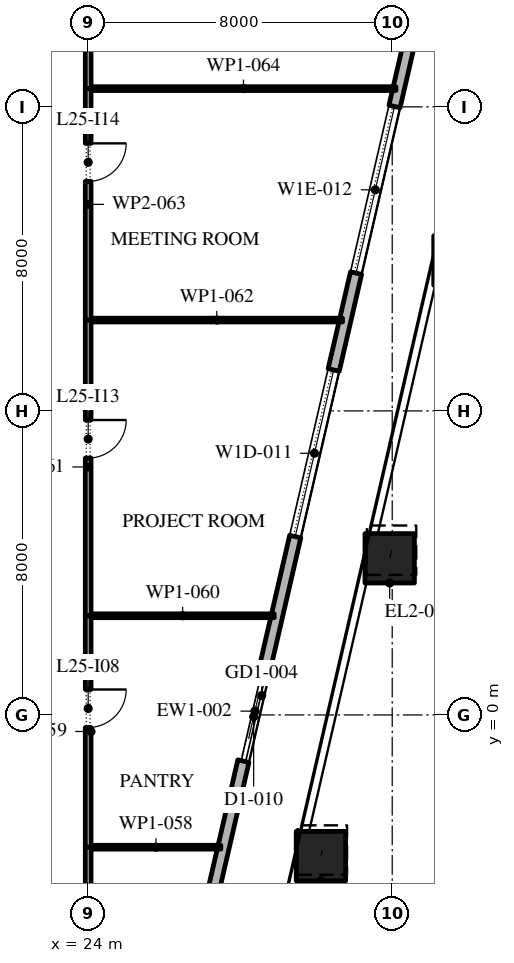
"""IFC4 building model, lengths in metres.
Left out: names, types, materials, properties, quantities, classifications, styles, units other than length and angle.
Written with IfcOpenShell. Run it as: python <this file> out.ifc"""

import sys

from ifc_helpers import new_model, si_unit, direction, frame, frame_2d, origin, origin_2d, place, context, subcontext, project, spatial, rectangle, extrude, element, fill, save


model = new_model("IFC4")
c1 = context("Model", 3, precision=1e-05, world=origin(), true_north=direction((0.0, 1.0)))
c2 = subcontext(c1, "Body", "Model", "MODEL_VIEW")
j1 = project(units=[si_unit("LENGTHUNIT", "METRE"), si_unit("PLANEANGLEUNIT", "RADIAN")], contexts=[c1])
p1 = place(None, origin())
s1 = spatial("IfcSite", under=j1, at=p1, CompositionType="ELEMENT")
p2 = place(p1, origin())
s2 = spatial("IfcBuilding", under=s1, at=p2, CompositionType="ELEMENT")
p3 = place(p2, frame((0.0, 0.0, 118.2)))
s3 = spatial("IfcBuildingStorey", under=s2, at=p3, CompositionType="ELEMENT", Elevation=118.2)
p4 = place(p3, frame((30.125, -3.714, 0.0), z_axis=(0.008770884695, 0.037929719907, 0.99924191662), x_axis=(-0.974290512438, 0.225295355862, 0.0)))
e1 = element("IfcColumn", 1, at=p4, inside=s3, PredefinedType="COLUMN", context=c2, shape_type="SweptSolid", body=[
    extrude(rectangle(XDim=1.3, YDim=1.3, at=origin_2d()), origin(), (0.0, 0.0, 1.0), 4.203),
])
p5 = place(p3, frame((31.934, 4.122, 0.0), z_axis=(0.011668267153, 0.050562490995, 0.998652735462), x_axis=(-0.974391195695, 0.224859506699, 0.0)))
e2 = element("IfcColumn", 2, at=p5, inside=s3, PredefinedType="COLUMN", context=c2, shape_type="SweptSolid", body=[
    extrude(rectangle(XDim=1.3, YDim=1.3, at=origin_2d()), origin(), (0.0, 0.0, 1.0), 4.206),
])
p6 = place(p3, frame((33.742, 11.957, 0.0), z_axis=(0.014559841898, 0.063111984005, 0.997900239743), x_axis=(-0.97440628778, 0.224794097641, 0.0)))
e3 = element("IfcColumn", 3, at=p6, inside=s3, PredefinedType="COLUMN", context=c2, shape_type="SweptSolid", body=[
    extrude(rectangle(XDim=1.3, YDim=1.3, at=origin_2d()), origin(), (0.0, 0.0, 1.0), 4.209),
])
p7 = place(p3, frame((22.82, -24.016, 0.0), z_axis=(0.0, 0.0, 1.0), x_axis=(0.224953880882, 0.974369412223, 0.0)))
e4 = element("IfcWall", 4, at=p7, inside=s3, PredefinedType="STANDARD", context=c2, shape_type="SweptSolid", body=[
    extrude(rectangle(XDim=49.5, YDim=0.3, at=frame_2d((24.75, 0.0))), origin(), (0.0, 0.0, 1.0), 4.0),
])
p8 = place(p7, frame((1.157, 0.0, 0.45)))
e5 = element("IfcOpeningElement", 5, at=p8, cuts=e4, PredefinedType="OPENING", context=c2, shape_type="SweptSolid", body=[
    extrude(rectangle(XDim=4.5, YDim=3.05, at=frame_2d((2.25, 1.525))), frame((0.0, 0.16, 0.0), z_axis=(0.0, -1.0, 0.0), x_axis=(1.0, 0.0, 0.0)), (0.0, 0.0, 1.0), 0.32),
])
p9 = place(p7, frame((8.121, 0.0, 0.45)))
e6 = element("IfcOpeningElement", 6, at=p9, cuts=e4, PredefinedType="OPENING", context=c2, shape_type="SweptSolid", body=[
    extrude(rectangle(XDim=4.5, YDim=3.05, at=frame_2d((2.25, 1.525))), frame((0.0, 0.16, 0.0), z_axis=(0.0, -1.0, 0.0), x_axis=(1.0, 0.0, 0.0)), (0.0, 0.0, 1.0), 0.32),
])
p10 = place(p7, frame((15.236, 0.0, 0.45)))
e7 = element("IfcOpeningElement", 7, at=p10, cuts=e4, PredefinedType="OPENING", context=c2, shape_type="SweptSolid", body=[
    extrude(rectangle(XDim=4.5, YDim=3.05, at=frame_2d((2.25, 1.525))), frame((0.0, 0.16, 0.0), z_axis=(0.0, -1.0, 0.0), x_axis=(1.0, 0.0, 0.0)), (0.0, 0.0, 1.0), 0.32),
])
p11 = place(p7, frame((23.4, 0.0, 0.0)))
e8 = element("IfcOpeningElement", 8, at=p11, cuts=e4, PredefinedType="OPENING", context=c2, shape_type="SweptSolid", body=[
    extrude(rectangle(XDim=2.4, YDim=3.5, at=frame_2d((1.2, 1.75))), frame((0.0, 0.16, 0.0), z_axis=(0.0, -1.0, 0.0), x_axis=(1.0, 0.0, 0.0)), (0.0, 0.0, 1.0), 0.32),
])
p12 = place(p7, frame((29.464, 0.0, 0.45)))
e9 = element("IfcOpeningElement", 9, at=p12, cuts=e4, PredefinedType="OPENING", context=c2, shape_type="SweptSolid", body=[
    extrude(rectangle(XDim=4.5, YDim=2.875, at=frame_2d((2.25, 1.438))), frame((0.0, 0.16, 0.0), z_axis=(0.0, -1.0, 0.0), x_axis=(1.0, 0.0, 0.0)), (0.0, 0.0, 1.0), 0.32),
])
p13 = place(p7, frame((36.579, 0.0, 0.45)))
e10 = element("IfcOpeningElement", 10, at=p13, cuts=e4, PredefinedType="OPENING", context=c2, shape_type="SweptSolid", body=[
    extrude(rectangle(XDim=4.5, YDim=2.825, at=frame_2d((2.25, 1.413))), frame((0.0, 0.16, 0.0), z_axis=(0.0, -1.0, 0.0), x_axis=(1.0, 0.0, 0.0)), (0.0, 0.0, 1.0), 0.32),
])
p14 = place(p7, frame((43.693, 0.0, 0.45)))
e11 = element("IfcOpeningElement", 11, at=p14, cuts=e4, PredefinedType="OPENING", context=c2, shape_type="SweptSolid", body=[
    extrude(rectangle(XDim=4.5, YDim=2.75, at=frame_2d((2.25, 1.375))), frame((0.0, 0.16, 0.0), z_axis=(0.0, -1.0, 0.0), x_axis=(1.0, 0.0, 0.0)), (0.0, 0.0, 1.0), 0.32),
])
p15 = place(p3, frame((24.0, -3.43, 0.0), z_axis=(0.0, 0.0, 1.0), x_axis=(0.0, -1.0, 0.0)))
e12 = element("IfcWall", 12, at=p15, inside=s3, PredefinedType="PARTITIONING", context=c2, shape_type="SweptSolid", body=[
    extrude(rectangle(XDim=4.195, YDim=0.15, at=frame_2d((2.098, 0.0))), origin(), (0.0, 0.0, 1.0), 4.0),
])
p16 = place(p15, frame((2.12, 0.0, 0.0)))
e13 = element("IfcOpeningElement", 13, at=p16, cuts=e12, PredefinedType="OPENING", context=c2, shape_type="SweptSolid", body=[
    extrude(rectangle(XDim=1.0, YDim=2.1, at=frame_2d((0.5, 1.05))), frame((0.0, 0.085, 0.0), z_axis=(0.0, -1.0, 0.0), x_axis=(1.0, 0.0, 0.0)), (0.0, 0.0, 1.0), 0.17),
])
p17 = place(p3, frame((24.075, -3.48, 0.0), z_axis=(0.0, 0.0, 1.0), x_axis=(1.0, 0.0, 0.0)))
e14 = element("IfcWall", 14, at=p17, inside=s3, PredefinedType="PARTITIONING", context=c2, shape_type="SweptSolid", body=[
    extrude(rectangle(XDim=3.415, YDim=0.1, at=frame_2d((1.708, 0.0))), origin(), (0.0, 0.0, 1.0), 4.0),
])
p18 = place(p3, frame((24.0, 2.61, 0.0), z_axis=(0.0, 0.0, 1.0), x_axis=(0.0, -1.0, 0.0)))
e15 = element("IfcWall", 15, at=p18, inside=s3, PredefinedType="PARTITIONING", context=c2, shape_type="SweptSolid", body=[
    extrude(rectangle(XDim=6.09, YDim=0.15, at=frame_2d((3.045, 0.0))), origin(), (0.0, 0.0, 1.0), 4.0),
])
p19 = place(p18, frame((1.94, 0.0, 0.0)))
e16 = element("IfcOpeningElement", 16, at=p19, cuts=e15, PredefinedType="OPENING", context=c2, shape_type="SweptSolid", body=[
    extrude(rectangle(XDim=1.0, YDim=2.1, at=frame_2d((0.5, 1.05))), frame((0.0, 0.085, 0.0), z_axis=(0.0, -1.0, 0.0), x_axis=(1.0, 0.0, 0.0)), (0.0, 0.0, 1.0), 0.17),
])
p20 = place(p3, frame((24.075, 2.61, 0.0), z_axis=(0.0, 0.0, 1.0), x_axis=(1.0, 0.0, 0.0)))
e17 = element("IfcWall", 17, at=p20, inside=s3, PredefinedType="PARTITIONING", context=c2, shape_type="SweptSolid", body=[
    extrude(rectangle(XDim=4.821, YDim=0.1, at=frame_2d((2.411, 0.0))), origin(), (0.0, 0.0, 1.0), 4.0),
])
p21 = place(p3, frame((24.0, 10.44, 0.0), z_axis=(0.0, 0.0, 1.0), x_axis=(0.0, -1.0, 0.0)))
e18 = element("IfcWall", 18, at=p21, inside=s3, PredefinedType="PARTITIONING", context=c2, shape_type="SweptSolid", body=[
    extrude(rectangle(XDim=7.83, YDim=0.15, at=frame_2d((3.915, 0.0))), origin(), (0.0, 0.0, 1.0), 4.0),
])
p22 = place(p21, frame((2.68, 0.0, 0.0)))
e19 = element("IfcOpeningElement", 19, at=p22, cuts=e18, PredefinedType="OPENING", context=c2, shape_type="SweptSolid", body=[
    extrude(rectangle(XDim=1.0, YDim=2.1, at=frame_2d((0.5, 1.05))), frame((0.0, 0.085, 0.0), z_axis=(0.0, -1.0, 0.0), x_axis=(1.0, 0.0, 0.0)), (0.0, 0.0, 1.0), 0.17),
])
p23 = place(p3, frame((24.075, 10.39, 0.0), z_axis=(0.0, 0.0, 1.0), x_axis=(1.0, 0.0, 0.0)))
e20 = element("IfcWall", 20, at=p23, inside=s3, PredefinedType="PARTITIONING", context=c2, shape_type="SweptSolid", body=[
    extrude(rectangle(XDim=6.617, YDim=0.1, at=frame_2d((3.309, 0.0))), origin(), (0.0, 0.0, 1.0), 4.0),
])
p24 = place(p3, frame((24.0, 16.48, 0.0), z_axis=(0.0, 0.0, 1.0), x_axis=(0.0, -1.0, 0.0)))
e21 = element("IfcWall", 21, at=p24, inside=s3, PredefinedType="PARTITIONING", context=c2, shape_type="SweptSolid", body=[
    extrude(rectangle(XDim=6.09, YDim=0.15, at=frame_2d((3.045, 0.0))), origin(), (0.0, 0.0, 1.0), 4.0),
])
p25 = place(p24, frame((1.44, 0.0, 0.0)))
e22 = element("IfcOpeningElement", 22, at=p25, cuts=e21, PredefinedType="OPENING", context=c2, shape_type="SweptSolid", body=[
    extrude(rectangle(XDim=1.0, YDim=2.1, at=frame_2d((0.5, 1.05))), frame((0.0, 0.085, 0.0), z_axis=(0.0, -1.0, 0.0), x_axis=(1.0, 0.0, 0.0)), (0.0, 0.0, 1.0), 0.17),
])
p26 = place(p3, frame((24.075, 16.48, 0.0), z_axis=(0.0, 0.0, 1.0), x_axis=(1.0, 0.0, 0.0)))
e23 = element("IfcWall", 23, at=p26, inside=s3, PredefinedType="PARTITIONING", context=c2, shape_type="SweptSolid", body=[
    extrude(rectangle(XDim=8.023, YDim=0.1, at=frame_2d((4.011, 0.0))), origin(), (0.0, 0.0, 1.0), 4.0),
])
p27 = place(p3, frame((24.0, 27.325, 0.0), z_axis=(0.0, 0.0, 1.0), x_axis=(0.0, -1.0, 0.0)))
e24 = element("IfcWall", 24, at=p27, inside=s3, PredefinedType="PARTITIONING", context=c2, shape_type="SweptSolid", body=[
    extrude(rectangle(XDim=10.845, YDim=0.15, at=frame_2d((5.422, 0.0))), origin(), (0.0, 0.0, 1.0), 4.0),
])
p28 = place(p27, frame((3.695, 0.0, 0.0)))
e25 = element("IfcOpeningElement", 25, at=p28, cuts=e24, PredefinedType="OPENING", context=c2, shape_type="SweptSolid", body=[
    extrude(rectangle(XDim=1.0, YDim=2.1, at=frame_2d((0.5, 1.05))), frame((0.0, 0.085, 0.0), z_axis=(0.0, -1.0, 0.0), x_axis=(1.0, 0.0, 0.0)), (0.0, 0.0, 1.0), 0.17),
])
p29 = place(p11, origin())
e26 = element("IfcDoor", 26, at=p29, inside=s3, OperationType="DOUBLE_DOOR_SLIDING", PredefinedType="DOOR", context=c2, shape_type="SweptSolid", body=[
    extrude(rectangle(XDim=2.4, YDim=3.5, at=frame_2d((1.2, 1.75))), frame((0.0, 0.025, 0.0), z_axis=(0.0, -1.0, 0.0), x_axis=(1.0, 0.0, 0.0)), (0.0, 0.0, 1.0), 0.05),
])
fill(e8, e26)
p30 = place(p12, origin())
e27 = element("IfcWindow", 27, at=p30, inside=s3, PartitioningType="DOUBLE_PANEL_VERTICAL", PredefinedType="WINDOW", context=c2, shape_type="SweptSolid", body=[
    extrude(rectangle(XDim=4.5, YDim=2.875, at=frame_2d((2.25, 1.438))), frame((0.0, 0.03, 0.0), z_axis=(0.0, -1.0, 0.0), x_axis=(1.0, 0.0, 0.0)), (0.0, 0.0, 1.0), 0.06),
])
fill(e9, e27)
p31 = place(p13, origin())
e28 = element("IfcWindow", 28, at=p31, inside=s3, PartitioningType="DOUBLE_PANEL_VERTICAL", PredefinedType="WINDOW", context=c2, shape_type="SweptSolid", body=[
    extrude(rectangle(XDim=4.5, YDim=2.825, at=frame_2d((2.25, 1.413))), frame((0.0, 0.03, 0.0), z_axis=(0.0, -1.0, 0.0), x_axis=(1.0, 0.0, 0.0)), (0.0, 0.0, 1.0), 0.06),
])
fill(e10, e28)
p32 = place(p19, origin())
e29 = element("IfcDoor", 29, at=p32, inside=s3, OperationType="SINGLE_SWING_RIGHT", PredefinedType="DOOR", context=c2, shape_type="SweptSolid", body=[
    extrude(rectangle(XDim=1.0, YDim=2.1, at=frame_2d((0.5, 1.05))), frame((0.0, 0.025, 0.0), z_axis=(0.0, -1.0, 0.0), x_axis=(1.0, 0.0, 0.0)), (0.0, 0.0, 1.0), 0.05),
])
fill(e16, e29)
p33 = place(p22, origin())
e30 = element("IfcDoor", 30, at=p33, inside=s3, OperationType="SINGLE_SWING_RIGHT", PredefinedType="DOOR", context=c2, shape_type="SweptSolid", body=[
    extrude(rectangle(XDim=1.0, YDim=2.1, at=frame_2d((0.5, 1.05))), frame((0.0, 0.025, 0.0), z_axis=(0.0, -1.0, 0.0), x_axis=(1.0, 0.0, 0.0)), (0.0, 0.0, 1.0), 0.05),
])
fill(e19, e30)
p34 = place(p25, origin())
e31 = element("IfcDoor", 31, at=p34, inside=s3, OperationType="SINGLE_SWING_RIGHT", PredefinedType="DOOR", context=c2, shape_type="SweptSolid", body=[
    extrude(rectangle(XDim=1.0, YDim=2.1, at=frame_2d((0.5, 1.05))), frame((0.0, 0.025, 0.0), z_axis=(0.0, -1.0, 0.0), x_axis=(1.0, 0.0, 0.0)), (0.0, 0.0, 1.0), 0.05),
])
fill(e22, e31)
save(model, sys.argv[1])
